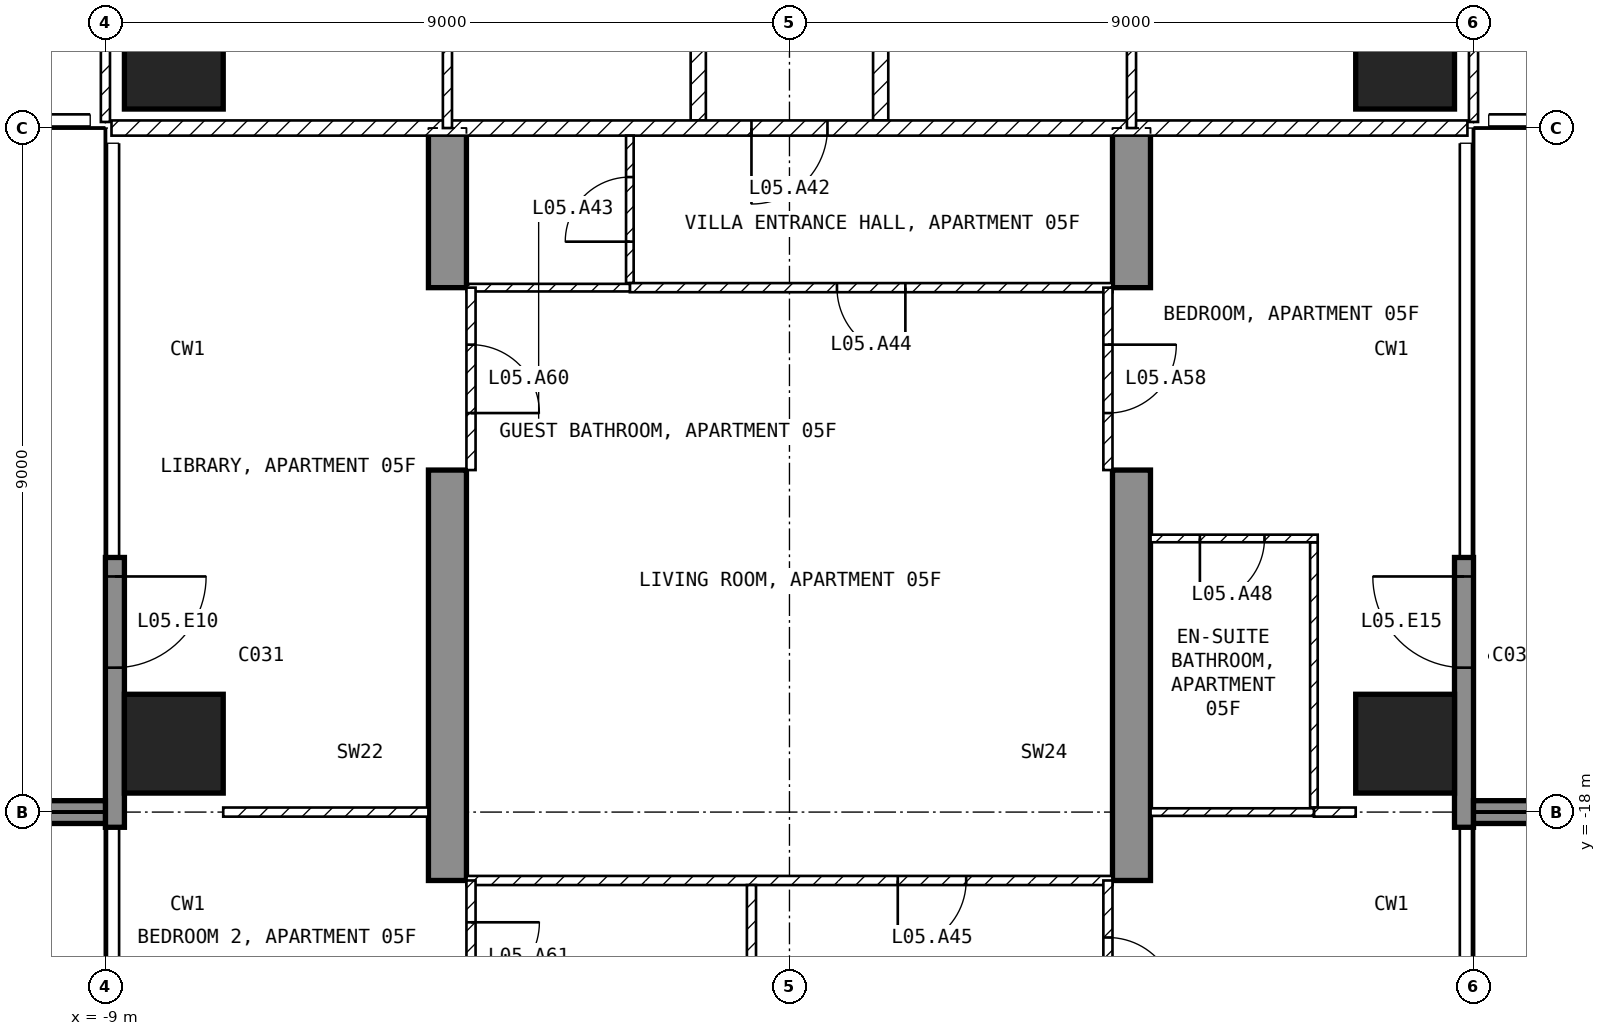
"""IFC4 building model, lengths in metres.
Left out: names, types, materials, properties, quantities, classifications, styles, units other than length and angle.
Written with IfcOpenShell. Run it as: python <this file> out.ifc"""

import sys

from ifc_helpers import new_model, si_unit, direction, frame, frame_2d, origin, origin_2d, place, context, subcontext, project, spatial, polyline, rectangle, outline, extrude, element, fill, save


model = new_model("IFC4")
c1 = context("Model", 3, precision=1e-05, world=origin(), true_north=direction((0.0, 1.0)))
c2 = subcontext(c1, "Body", "Model", "MODEL_VIEW")
j1 = project(units=[si_unit("LENGTHUNIT", "METRE"), si_unit("PLANEANGLEUNIT", "RADIAN")], contexts=[c1])
p1 = place(None, origin())
s1 = spatial("IfcSite", under=j1, at=p1, CompositionType="ELEMENT")
p2 = place(p1, origin())
s2 = spatial("IfcBuilding", under=s1, at=p2, CompositionType="ELEMENT")
p3 = place(p2, frame((0.0, 0.0, 36.5)))
s3 = spatial("IfcBuildingStorey", under=s2, at=p3, CompositionType="ELEMENT", Elevation=36.5)
for number, where, z_axis, x_axis in (
    (1, (-8.1, -17.1, -0.25), (0.0, 0.0, 1.0), (1.0, 0.0, 0.0)),
    (2, (-8.1, -8.1, -0.25), (0.0, 0.0, 1.0), (1.0, 0.0, 0.0)),
    (3, (8.1, -17.1, -0.25), (0.0, 0.0, 1.0), (1.0, 0.0, 0.0)),
    (4, (8.1, -8.1, -0.25), (0.0, 0.0, 1.0), (1.0, 0.0, 0.0)),
):
    element("IfcColumn", number, at=place(p3, frame(where, z_axis=z_axis, x_axis=x_axis)), inside=s3, PredefinedType="COLUMN", context=c2, shape_type="SweptSolid", body=[
        extrude(rectangle(XDim=1.3, YDim=1.3, at=origin_2d()), origin(), (0.0, 0.0, 1.0), 3.5),
    ])
for number, where, z_axis, x_axis in (
    (5, (-4.75, -25.45, -0.25), (1.0, 0.0, 0.0), (0.0, 1.0, 0.0)),
    (6, (4.25, -25.45, -0.25), (1.0, 0.0, 0.0), (0.0, 1.0, 0.0)),
):
    element("IfcWall", number, at=place(p3, frame(where, z_axis=z_axis, x_axis=x_axis)), inside=s3, PredefinedType="SHEAR", context=c2, shape_type="SweptSolid", body=[
        extrude(outline(polyline([(0.0, 0.0), (4.15, 0.0), (4.15, 2.65), (6.55, 2.65), (6.55, 0.0), (11.95, 0.0), (11.95, 2.65), (14.35, 2.65), (14.35, 0.0), (16.45, 0.0), (16.45, 3.5), (0.0, 3.5), (0.0, 0.0)])), origin(), (0.0, 0.0, 1.0), 0.5),
    ])
p4 = place(p3, frame((-8.875, -14.65, 0.0), z_axis=(0.0, 0.0, 1.0), x_axis=(0.0, -1.0, 0.0)))
e7 = element("IfcWall", 7, at=p4, inside=s3, PredefinedType="SOLIDWALL", context=c2, shape_type="SweptSolid", body=[
    extrude(rectangle(XDim=3.55, YDim=0.25, at=frame_2d((1.775, 0.0))), origin(), (0.0, 0.0, 1.0), 3.25),
])
p5 = place(p4, frame((0.25, 0.0, 0.0)))
e8 = element("IfcOpeningElement", 8, at=p5, cuts=e7, PredefinedType="OPENING", context=c2, shape_type="SweptSolid", body=[
    extrude(rectangle(XDim=1.2, YDim=2.4, at=frame_2d((0.6, 1.2))), frame((0.0, 0.135, 0.0), z_axis=(0.0, -1.0, 0.0), x_axis=(1.0, 0.0, 0.0)), (0.0, 0.0, 1.0), 0.27),
])
p6 = place(p3, frame((8.875, -18.2, 0.0), z_axis=(0.0, 0.0, 1.0), x_axis=(0.0, 1.0, 0.0)))
e9 = element("IfcWall", 9, at=p6, inside=s3, PredefinedType="SOLIDWALL", context=c2, shape_type="SweptSolid", body=[
    extrude(rectangle(XDim=3.55, YDim=0.25, at=frame_2d((1.775, 0.0))), origin(), (0.0, 0.0, 1.0), 3.25),
])
p7 = place(p6, frame((2.1, 0.0, 0.0)))
e10 = element("IfcOpeningElement", 10, at=p7, cuts=e9, PredefinedType="OPENING", context=c2, shape_type="SweptSolid", body=[
    extrude(rectangle(XDim=1.2, YDim=2.4, at=frame_2d((0.6, 1.2))), frame((0.0, 0.135, 0.0), z_axis=(0.0, -1.0, 0.0), x_axis=(1.0, 0.0, 0.0)), (0.0, 0.0, 1.0), 0.27),
])
for number, where, z_axis, x_axis in (
    (11, (-9.0, -18.0, 0.0), (0.0, 0.0, 1.0), (-1.0, 0.0, 0.0)),
    (12, (9.0, -18.0, 0.0), (0.0, 0.0, 1.0), (1.0, 0.0, 0.0)),
):
    element("IfcWall", number, at=place(p3, frame(where, z_axis=z_axis, x_axis=x_axis)), inside=s3, PredefinedType="SOLIDWALL", context=c2, shape_type="SweptSolid", body=[
        extrude(rectangle(XDim=2.7, YDim=0.3, at=frame_2d((1.35, 0.0))), origin(), (0.0, 0.0, 1.0), 3.25),
    ])
for number, where, z_axis, x_axis in (
    (13, (1.2, -1.3, 0.0), (0.0, 0.0, 1.0), (0.0, -1.0, 0.0)),
    (14, (-1.2, -8.9, 0.0), (0.0, 0.0, 1.0), (0.0, 1.0, 0.0)),
):
    element("IfcWall", number, at=place(p3, frame(where, z_axis=z_axis, x_axis=x_axis)), inside=s3, PredefinedType="PARTITIONING", context=c2, shape_type="SweptSolid", body=[
        extrude(rectangle(XDim=7.6, YDim=0.2, at=frame_2d((3.8, 0.0))), origin(), (0.0, 0.0, 1.0), 3.25),
    ])
p8 = place(p3, frame((8.92, -9.0, 0.0), z_axis=(0.0, 0.0, 1.0), x_axis=(-1.0, 0.0, 0.0)))
e15 = element("IfcWall", 15, at=p8, inside=s3, PredefinedType="PARTITIONING", context=c2, shape_type="SweptSolid", body=[
    extrude(rectangle(XDim=17.84, YDim=0.2, at=frame_2d((8.92, 0.0))), origin(), (0.0, 0.0, 1.0), 3.25),
])
p9 = place(p8, frame((8.42, 0.0, 0.0)))
e16 = element("IfcOpeningElement", 16, at=p9, cuts=e15, PredefinedType="OPENING", context=c2, shape_type="SweptSolid", body=[
    extrude(rectangle(XDim=1.0, YDim=2.1, at=frame_2d((0.5, 1.05))), frame((0.0, 0.11, 0.0), z_axis=(0.0, -1.0, 0.0), x_axis=(1.0, 0.0, 0.0)), (0.0, 0.0, 1.0), 0.22),
])
p10 = place(p3, frame((9.0, -8.92, 0.0), z_axis=(0.0, 0.0, 1.0), x_axis=(0.0, 1.0, 0.0)))
e17 = element("IfcWall", 17, at=p10, inside=s3, PredefinedType="PARTITIONING", context=c2, shape_type="SweptSolid", body=[
    extrude(rectangle(XDim=7.62, YDim=0.12, at=frame_2d((3.81, 0.0))), origin(), (0.0, 0.0, 1.0), 3.25),
])
p11 = place(p10, frame((2.67, 0.0, 0.0)))
e18 = element("IfcOpeningElement", 18, at=p11, cuts=e17, PredefinedType="OPENING", context=c2, shape_type="SweptSolid", body=[
    extrude(rectangle(XDim=0.9, YDim=2.1, at=frame_2d((0.45, 1.05))), frame((0.0, 0.07, 0.0), z_axis=(0.0, -1.0, 0.0), x_axis=(1.0, 0.0, 0.0)), (0.0, 0.0, 1.0), 0.14),
])
p12 = place(p3, frame((4.5, -9.0, 0.0), z_axis=(0.0, 0.0, 1.0), x_axis=(0.0, 1.0, 0.0)))
e19 = element("IfcWall", 19, at=p12, inside=s3, PredefinedType="PARTITIONING", context=c2, shape_type="SweptSolid", body=[
    extrude(rectangle(XDim=4.68, YDim=0.12, at=frame_2d((2.34, 0.0))), origin(), (0.0, 0.0, 1.0), 3.25),
])
p13 = place(p12, frame((1.89, 0.0, 0.0)))
e20 = element("IfcOpeningElement", 20, at=p13, cuts=e19, PredefinedType="OPENING", context=c2, shape_type="SweptSolid", body=[
    extrude(rectangle(XDim=0.9, YDim=2.1, at=frame_2d((0.45, 1.05))), frame((0.0, 0.07, 0.0), z_axis=(0.0, -1.0, 0.0), x_axis=(1.0, 0.0, 0.0)), (0.0, 0.0, 1.0), 0.14),
])
p14 = place(p3, frame((-9.0, -1.3, 0.0), z_axis=(0.0, 0.0, 1.0), x_axis=(0.0, -1.0, 0.0)))
e21 = element("IfcWall", 21, at=p14, inside=s3, PredefinedType="PARTITIONING", context=c2, shape_type="SweptSolid", body=[
    extrude(rectangle(XDim=7.62, YDim=0.12, at=frame_2d((3.81, 0.0))), origin(), (0.0, 0.0, 1.0), 3.25),
])
p15 = place(p14, frame((1.15, 0.0, 0.0)))
e22 = element("IfcOpeningElement", 22, at=p15, cuts=e21, PredefinedType="OPENING", context=c2, shape_type="SweptSolid", body=[
    extrude(rectangle(XDim=0.9, YDim=2.1, at=frame_2d((0.45, 1.05))), frame((0.0, 0.07, 0.0), z_axis=(0.0, -1.0, 0.0), x_axis=(1.0, 0.0, 0.0)), (0.0, 0.0, 1.0), 0.14),
])
p16 = place(p3, frame((-4.5, -4.32, 0.0), z_axis=(0.0, 0.0, 1.0), x_axis=(0.0, -1.0, 0.0)))
e23 = element("IfcWall", 23, at=p16, inside=s3, PredefinedType="PARTITIONING", context=c2, shape_type="SweptSolid", body=[
    extrude(rectangle(XDim=4.68, YDim=0.12, at=frame_2d((2.34, 0.0))), origin(), (0.0, 0.0, 1.0), 3.25),
])
p17 = place(p16, frame((1.89, 0.0, 0.0)))
e24 = element("IfcOpeningElement", 24, at=p17, cuts=e23, PredefinedType="OPENING", context=c2, shape_type="SweptSolid", body=[
    extrude(rectangle(XDim=0.9, YDim=2.1, at=frame_2d((0.45, 1.05))), frame((0.0, 0.07, 0.0), z_axis=(0.0, -1.0, 0.0), x_axis=(1.0, 0.0, 0.0)), (0.0, 0.0, 1.0), 0.14),
])
p18 = place(p3, frame((-2.1, -11.04, 0.0), z_axis=(0.0, 0.0, 1.0), x_axis=(0.0, 1.0, 0.0)))
e25 = element("IfcWall", 25, at=p18, inside=s3, PredefinedType="PARTITIONING", context=c2, shape_type="SweptSolid", body=[
    extrude(rectangle(XDim=1.94, YDim=0.1, at=frame_2d((0.97, 0.0))), origin(), (0.0, 0.0, 1.0), 3.25),
])
p19 = place(p18, frame((0.545, 0.0, 0.0)))
e26 = element("IfcOpeningElement", 26, at=p19, cuts=e25, PredefinedType="OPENING", context=c2, shape_type="SweptSolid", body=[
    extrude(rectangle(XDim=0.85, YDim=2.1, at=frame_2d((0.425, 1.05))), frame((0.0, 0.06, 0.0), z_axis=(0.0, -1.0, 0.0), x_axis=(1.0, 0.0, 0.0)), (0.0, 0.0, 1.0), 0.12),
])
p20 = place(p3, frame((4.25, -11.1, 0.0), z_axis=(0.0, 0.0, 1.0), x_axis=(-1.0, 0.0, 0.0)))
e27 = element("IfcWall", 27, at=p20, inside=s3, PredefinedType="PARTITIONING", context=c2, shape_type="SweptSolid", body=[
    extrude(rectangle(XDim=6.35, YDim=0.12, at=frame_2d((3.175, 0.0))), origin(), (0.0, 0.0, 1.0), 3.25),
])
p21 = place(p20, frame((2.725, 0.0, 0.0)))
e28 = element("IfcOpeningElement", 28, at=p21, cuts=e27, PredefinedType="OPENING", context=c2, shape_type="SweptSolid", body=[
    extrude(rectangle(XDim=0.9, YDim=2.1, at=frame_2d((0.45, 1.05))), frame((0.0, 0.07, 0.0), z_axis=(0.0, -1.0, 0.0), x_axis=(1.0, 0.0, 0.0)), (0.0, 0.0, 1.0), 0.14),
])
p22 = place(p3, frame((-2.1, -11.1, 0.0), z_axis=(0.0, 0.0, 1.0), x_axis=(-1.0, 0.0, 0.0)))
e29 = element("IfcWall", 29, at=p22, inside=s3, PredefinedType="PARTITIONING", context=c2, shape_type="SweptSolid", body=[
    extrude(rectangle(XDim=2.15, YDim=0.1, at=frame_2d((1.075, 0.0))), origin(), (0.0, 0.0, 1.0), 3.25),
])
p23 = place(p3, frame((4.25, -18.9, 0.0), z_axis=(0.0, 0.0, 1.0), x_axis=(-1.0, 0.0, 0.0)))
e30 = element("IfcWall", 30, at=p23, inside=s3, PredefinedType="PARTITIONING", context=c2, shape_type="SweptSolid", body=[
    extrude(rectangle(XDim=8.5, YDim=0.12, at=frame_2d((4.25, 0.0))), origin(), (0.0, 0.0, 1.0), 3.25),
])
p24 = place(p23, frame((1.925, 0.0, 0.0)))
e31 = element("IfcOpeningElement", 31, at=p24, cuts=e30, PredefinedType="OPENING", context=c2, shape_type="SweptSolid", body=[
    extrude(rectangle(XDim=0.9, YDim=2.1, at=frame_2d((0.45, 1.05))), frame((0.0, 0.07, 0.0), z_axis=(0.0, -1.0, 0.0), x_axis=(1.0, 0.0, 0.0)), (0.0, 0.0, 1.0), 0.14),
])
p25 = place(p3, frame((-0.5, -23.34, 0.0), z_axis=(0.0, 0.0, 1.0), x_axis=(0.0, 1.0, 0.0)))
e32 = element("IfcWall", 32, at=p25, inside=s3, PredefinedType="PARTITIONING", context=c2, shape_type="SweptSolid", body=[
    extrude(rectangle(XDim=4.38, YDim=0.12, at=frame_2d((2.19, 0.0))), origin(), (0.0, 0.0, 1.0), 3.25),
])
p26 = place(p25, frame((1.74, 0.0, 0.0)))
e33 = element("IfcOpeningElement", 33, at=p26, cuts=e32, PredefinedType="OPENING", context=c2, shape_type="SweptSolid", body=[
    extrude(rectangle(XDim=0.9, YDim=2.1, at=frame_2d((0.45, 1.05))), frame((0.0, 0.07, 0.0), z_axis=(0.0, -1.0, 0.0), x_axis=(1.0, 0.0, 0.0)), (0.0, 0.0, 1.0), 0.14),
])
p27 = place(p3, frame((6.9, -17.94, 0.0), z_axis=(0.0, 0.0, 1.0), x_axis=(0.0, 1.0, 0.0)))
e34 = element("IfcWall", 34, at=p27, inside=s3, PredefinedType="PARTITIONING", context=c2, shape_type="SweptSolid", body=[
    extrude(rectangle(XDim=3.49, YDim=0.1, at=frame_2d((1.745, 0.0))), origin(), (0.0, 0.0, 1.0), 3.25),
])
p28 = place(p3, frame((6.95, -14.4, 0.0), z_axis=(0.0, 0.0, 1.0), x_axis=(-1.0, 0.0, 0.0)))
e35 = element("IfcWall", 35, at=p28, inside=s3, PredefinedType="PARTITIONING", context=c2, shape_type="SweptSolid", body=[
    extrude(rectangle(XDim=2.2, YDim=0.1, at=frame_2d((1.1, 0.0))), origin(), (0.0, 0.0, 1.0), 3.25),
])
p29 = place(p28, frame((0.7, 0.0, 0.0)))
e36 = element("IfcOpeningElement", 36, at=p29, cuts=e35, PredefinedType="OPENING", context=c2, shape_type="SweptSolid", body=[
    extrude(rectangle(XDim=0.85, YDim=2.1, at=frame_2d((0.425, 1.05))), frame((0.0, 0.06, 0.0), z_axis=(0.0, -1.0, 0.0), x_axis=(1.0, 0.0, 0.0)), (0.0, 0.0, 1.0), 0.12),
])
p30 = place(p3, frame((7.45, -18.0, 0.0), z_axis=(0.0, 0.0, 1.0), x_axis=(-1.0, 0.0, 0.0)))
e37 = element("IfcWall", 37, at=p30, inside=s3, PredefinedType="PARTITIONING", context=c2, shape_type="SweptSolid", body=[
    extrude(rectangle(XDim=0.55, YDim=0.12, at=frame_2d((0.275, 0.0))), origin(), (0.0, 0.0, 1.0), 3.25),
])
p31 = place(p3, frame((6.9, -18.0, 0.0), z_axis=(0.0, 0.0, 1.0), x_axis=(-1.0, 0.0, 0.0)))
e38 = element("IfcWall", 38, at=p31, inside=s3, PredefinedType="PARTITIONING", context=c2, shape_type="SweptSolid", body=[
    extrude(rectangle(XDim=2.15, YDim=0.1, at=frame_2d((1.075, 0.0))), origin(), (0.0, 0.0, 1.0), 3.25),
])
p32 = place(p3, frame((-4.75, -18.0, 0.0), z_axis=(0.0, 0.0, 1.0), x_axis=(-1.0, 0.0, 0.0)))
e39 = element("IfcWall", 39, at=p32, inside=s3, PredefinedType="PARTITIONING", context=c2, shape_type="SweptSolid", body=[
    extrude(rectangle(XDim=2.7, YDim=0.12, at=frame_2d((1.35, 0.0))), origin(), (0.0, 0.0, 1.0), 3.25),
])
p33 = place(p3, frame((4.19, -11.1, 0.0), z_axis=(0.0, 0.0, 1.0), x_axis=(0.0, -1.0, 0.0)))
e40 = element("IfcWall", 40, at=p33, inside=s3, PredefinedType="PARTITIONING", context=c2, shape_type="SweptSolid", body=[
    extrude(rectangle(XDim=2.4, YDim=0.12, at=frame_2d((1.2, 0.0))), origin(), (0.0, 0.0, 1.0), 2.4),
])
p34 = place(p33, frame((0.75, 0.0, 0.0)))
e41 = element("IfcOpeningElement", 41, at=p34, cuts=e40, PredefinedType="OPENING", context=c2, shape_type="SweptSolid", body=[
    extrude(rectangle(XDim=0.9, YDim=2.1, at=frame_2d((0.45, 1.05))), frame((0.0, 0.07, 0.0), z_axis=(0.0, -1.0, 0.0), x_axis=(1.0, 0.0, 0.0)), (0.0, 0.0, 1.0), 0.14),
])
p35 = place(p3, frame((4.19, -18.9, 0.0), z_axis=(0.0, 0.0, 1.0), x_axis=(0.0, -1.0, 0.0)))
e42 = element("IfcWall", 42, at=p35, inside=s3, PredefinedType="PARTITIONING", context=c2, shape_type="SweptSolid", body=[
    extrude(rectangle(XDim=2.4, YDim=0.12, at=frame_2d((1.2, 0.0))), origin(), (0.0, 0.0, 1.0), 2.4),
])
p36 = place(p35, frame((0.75, 0.0, 0.0)))
e43 = element("IfcOpeningElement", 43, at=p36, cuts=e42, PredefinedType="OPENING", context=c2, shape_type="SweptSolid", body=[
    extrude(rectangle(XDim=0.9, YDim=2.1, at=frame_2d((0.45, 1.05))), frame((0.0, 0.07, 0.0), z_axis=(0.0, -1.0, 0.0), x_axis=(1.0, 0.0, 0.0)), (0.0, 0.0, 1.0), 0.14),
])
p37 = place(p3, frame((-4.19, -11.1, 0.0), z_axis=(0.0, 0.0, 1.0), x_axis=(0.0, -1.0, 0.0)))
e44 = element("IfcWall", 44, at=p37, inside=s3, PredefinedType="PARTITIONING", context=c2, shape_type="SweptSolid", body=[
    extrude(rectangle(XDim=2.4, YDim=0.12, at=frame_2d((1.2, 0.0))), origin(), (0.0, 0.0, 1.0), 2.4),
])
p38 = place(p37, frame((0.75, 0.0, 0.0)))
e45 = element("IfcOpeningElement", 45, at=p38, cuts=e44, PredefinedType="OPENING", context=c2, shape_type="SweptSolid", body=[
    extrude(rectangle(XDim=0.9, YDim=2.1, at=frame_2d((0.45, 1.05))), frame((0.0, 0.07, 0.0), z_axis=(0.0, -1.0, 0.0), x_axis=(1.0, 0.0, 0.0)), (0.0, 0.0, 1.0), 0.14),
])
p39 = place(p3, frame((-4.19, -18.9, 0.0), z_axis=(0.0, 0.0, 1.0), x_axis=(0.0, -1.0, 0.0)))
e46 = element("IfcWall", 46, at=p39, inside=s3, PredefinedType="PARTITIONING", context=c2, shape_type="SweptSolid", body=[
    extrude(rectangle(XDim=2.4, YDim=0.12, at=frame_2d((1.2, 0.0))), origin(), (0.0, 0.0, 1.0), 2.4),
])
p40 = place(p39, frame((0.55, 0.0, 0.0)))
e47 = element("IfcOpeningElement", 47, at=p40, cuts=e46, PredefinedType="OPENING", context=c2, shape_type="SweptSolid", body=[
    extrude(rectangle(XDim=0.9, YDim=2.1, at=frame_2d((0.45, 1.05))), frame((0.0, 0.07, 0.0), z_axis=(0.0, -1.0, 0.0), x_axis=(1.0, 0.0, 0.0)), (0.0, 0.0, 1.0), 0.14),
])
p41 = place(p5, origin())
e48 = element("IfcDoor", 48, at=p41, inside=s3, OperationType="SINGLE_SWING_LEFT", PredefinedType="DOOR", context=c2, shape_type="SweptSolid", body=[
    extrude(rectangle(XDim=1.2, YDim=2.4, at=frame_2d((0.6, 1.2))), frame((0.0, 0.025, 0.0), z_axis=(0.0, -1.0, 0.0), x_axis=(1.0, 0.0, 0.0)), (0.0, 0.0, 1.0), 0.05),
])
fill(e8, e48)
p42 = place(p7, origin())
e49 = element("IfcDoor", 49, at=p42, inside=s3, OperationType="SINGLE_SWING_RIGHT", PredefinedType="DOOR", context=c2, shape_type="SweptSolid", body=[
    extrude(rectangle(XDim=1.2, YDim=2.4, at=frame_2d((0.6, 1.2))), frame((0.0, 0.025, 0.0), z_axis=(0.0, -1.0, 0.0), x_axis=(1.0, 0.0, 0.0)), (0.0, 0.0, 1.0), 0.05),
])
fill(e10, e49)
p43 = place(p9, origin())
e50 = element("IfcDoor", 50, at=p43, inside=s3, OperationType="SINGLE_SWING_RIGHT", PredefinedType="DOOR", context=c2, shape_type="SweptSolid", body=[
    extrude(rectangle(XDim=1.0, YDim=2.1, at=frame_2d((0.5, 1.05))), frame((0.0, 0.025, 0.0), z_axis=(0.0, -1.0, 0.0), x_axis=(1.0, 0.0, 0.0)), (0.0, 0.0, 1.0), 0.05),
])
fill(e16, e50)
p44 = place(p19, origin())
e51 = element("IfcDoor", 51, at=p44, inside=s3, OperationType="SINGLE_SWING_LEFT", PredefinedType="DOOR", context=c2, shape_type="SweptSolid", body=[
    extrude(rectangle(XDim=0.85, YDim=2.1, at=frame_2d((0.425, 1.05))), frame((0.0, 0.025, 0.0), z_axis=(0.0, -1.0, 0.0), x_axis=(1.0, 0.0, 0.0)), (0.0, 0.0, 1.0), 0.05),
])
fill(e26, e51)
p45 = place(p21, origin())
e52 = element("IfcDoor", 52, at=p45, inside=s3, OperationType="SINGLE_SWING_LEFT", PredefinedType="DOOR", context=c2, shape_type="SweptSolid", body=[
    extrude(rectangle(XDim=0.9, YDim=2.1, at=frame_2d((0.45, 1.05))), frame((0.0, 0.025, 0.0), z_axis=(0.0, -1.0, 0.0), x_axis=(1.0, 0.0, 0.0)), (0.0, 0.0, 1.0), 0.05),
])
fill(e28, e52)
p46 = place(p24, origin())
e53 = element("IfcDoor", 53, at=p46, inside=s3, OperationType="SINGLE_SWING_RIGHT", PredefinedType="DOOR", context=c2, shape_type="SweptSolid", body=[
    extrude(rectangle(XDim=0.9, YDim=2.1, at=frame_2d((0.45, 1.05))), frame((0.0, 0.025, 0.0), z_axis=(0.0, -1.0, 0.0), x_axis=(1.0, 0.0, 0.0)), (0.0, 0.0, 1.0), 0.05),
])
fill(e31, e53)
p47 = place(p29, origin())
e54 = element("IfcDoor", 54, at=p47, inside=s3, OperationType="SINGLE_SWING_RIGHT", PredefinedType="DOOR", context=c2, shape_type="SweptSolid", body=[
    extrude(rectangle(XDim=0.85, YDim=2.1, at=frame_2d((0.425, 1.05))), frame((0.0, 0.025, 0.0), z_axis=(0.0, -1.0, 0.0), x_axis=(1.0, 0.0, 0.0)), (0.0, 0.0, 1.0), 0.05),
])
fill(e36, e54)
p48 = place(p34, origin())
e55 = element("IfcDoor", 55, at=p48, inside=s3, OperationType="SINGLE_SWING_LEFT", PredefinedType="DOOR", context=c2, shape_type="SweptSolid", body=[
    extrude(rectangle(XDim=0.9, YDim=2.1, at=frame_2d((0.45, 1.05))), frame((0.0, 0.025, 0.0), z_axis=(0.0, -1.0, 0.0), x_axis=(1.0, 0.0, 0.0)), (0.0, 0.0, 1.0), 0.05),
])
fill(e41, e55)
p49 = place(p36, origin())
e56 = element("IfcDoor", 56, at=p49, inside=s3, OperationType="SINGLE_SWING_RIGHT", PredefinedType="DOOR", context=c2, shape_type="SweptSolid", body=[
    extrude(rectangle(XDim=0.9, YDim=2.1, at=frame_2d((0.45, 1.05))), frame((0.0, 0.025, 0.0), z_axis=(0.0, -1.0, 0.0), x_axis=(1.0, 0.0, 0.0)), (0.0, 0.0, 1.0), 0.05),
])
fill(e43, e56)
p50 = place(p38, origin())
e57 = element("IfcDoor", 57, at=p50, inside=s3, OperationType="SINGLE_SWING_RIGHT", PredefinedType="DOOR", context=c2, shape_type="SweptSolid", body=[
    extrude(rectangle(XDim=0.9, YDim=2.1, at=frame_2d((0.45, 1.05))), frame((0.0, 0.025, 0.0), z_axis=(0.0, -1.0, 0.0), x_axis=(1.0, 0.0, 0.0)), (0.0, 0.0, 1.0), 0.05),
])
fill(e45, e57)
p51 = place(p40, origin())
e58 = element("IfcDoor", 58, at=p51, inside=s3, OperationType="SINGLE_SWING_LEFT", PredefinedType="DOOR", context=c2, shape_type="SweptSolid", body=[
    extrude(rectangle(XDim=0.9, YDim=2.1, at=frame_2d((0.45, 1.05))), frame((0.0, 0.025, 0.0), z_axis=(0.0, -1.0, 0.0), x_axis=(1.0, 0.0, 0.0)), (0.0, 0.0, 1.0), 0.05),
])
fill(e47, e58)
save(model, sys.argv[1])
